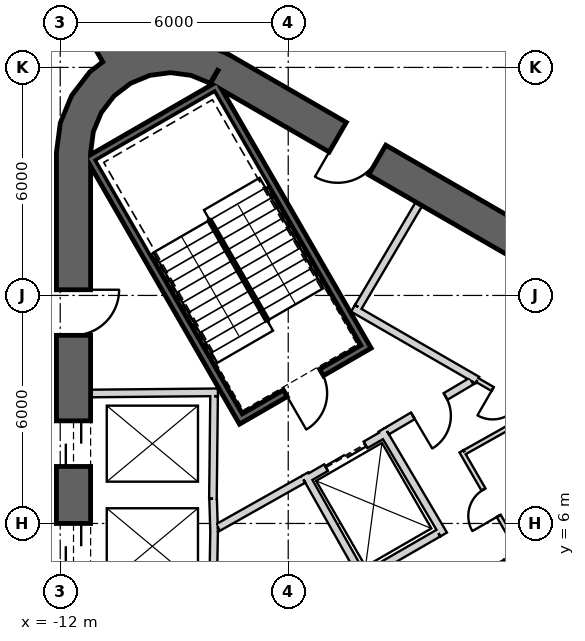
"""IFC4 building model, lengths in metres.
Left out: names, types, materials, properties, quantities, classifications, styles, units other than length and angle.
Written with IfcOpenShell. Run it as: python <this file> out.ifc"""

import sys

from ifc_helpers import new_model, si_unit, direction, frame, frame_2d, origin, place, context, subcontext, project, spatial, polyline, rectangle, outline, extrude, element, fill, save


model = new_model("IFC4")
c1 = context("Model", 3, precision=1e-05, world=origin(), true_north=direction((0.0, 1.0)))
c2 = subcontext(c1, "Body", "Model", "MODEL_VIEW")
j1 = project(units=[si_unit("LENGTHUNIT", "METRE"), si_unit("PLANEANGLEUNIT", "RADIAN")], contexts=[c1])
p1 = place(None, origin())
s1 = spatial("IfcSite", under=j1, at=p1, CompositionType="ELEMENT")
p2 = place(p1, origin())
s2 = spatial("IfcBuilding", under=s1, at=p2, CompositionType="ELEMENT")
p3 = place(p2, frame((0.0, 0.0, 217.2)))
s3 = spatial("IfcBuildingStorey", under=s2, at=p3, CompositionType="ELEMENT", Elevation=217.2)
p4 = place(p3, frame((19.475, 2.208, 0.0), z_axis=(0.0, 0.0, 1.0), x_axis=(-0.866028369851, 0.499994862586, 0.0)))
e1 = element("IfcWall", 1, at=p4, inside=s3, PredefinedType="SHEAR", context=c2, shape_type="SweptSolid", body=[
    extrude(rectangle(XDim=31.523, YDim=0.9, at=frame_2d((15.762, 0.0))), origin(), (0.0, 0.0, 1.0), 4.0),
])
p5 = place(p4, frame((7.062, 0.0, 0.0)))
e2 = element("IfcOpeningElement", 2, at=p5, cuts=e1, PredefinedType="OPENING", context=c2, shape_type="SweptSolid", body=[
    extrude(rectangle(XDim=1.2, YDim=2.4, at=frame_2d((0.6, 1.2))), frame((0.0, 0.46, 0.0), z_axis=(0.0, -1.0, 0.0), x_axis=(1.0, 0.0, 0.0)), (0.0, 0.0, 1.0), 0.92),
])
p6 = place(p4, frame((3.612, 0.0, 0.0)))
e3 = element("IfcOpeningElement", 3, at=p6, cuts=e1, PredefinedType="OPENING", context=c2, shape_type="SweptSolid", body=[
    extrude(rectangle(XDim=1.2, YDim=2.4, at=frame_2d((0.6, 1.2))), frame((0.0, 0.46, 0.0), z_axis=(0.0, -1.0, 0.0), x_axis=(1.0, 0.0, 0.0)), (0.0, 0.0, 1.0), 0.92),
])
p7 = place(p4, frame((26.712, 0.0, 0.0)))
e4 = element("IfcOpeningElement", 4, at=p7, cuts=e1, PredefinedType="OPENING", context=c2, shape_type="SweptSolid", body=[
    extrude(rectangle(XDim=1.2, YDim=2.4, at=frame_2d((0.6, 1.2))), frame((0.0, 0.46, 0.0), z_axis=(0.0, -1.0, 0.0), x_axis=(1.0, 0.0, 0.0)), (0.0, 0.0, 1.0), 0.92),
])
p8 = place(p3, frame((-11.65, 15.762, 0.0), z_axis=(0.0, 0.0, 1.0), x_axis=(0.0, -1.0, 0.0)))
e5 = element("IfcWall", 5, at=p8, inside=s3, PredefinedType="SHEAR", context=c2, shape_type="SweptSolid", body=[
    extrude(rectangle(XDim=31.523, YDim=0.9, at=frame_2d((15.762, 0.0))), origin(), (0.0, 0.0, 1.0), 4.0),
])
p9 = place(p8, frame((7.062, 0.0, 0.0)))
e6 = element("IfcOpeningElement", 6, at=p9, cuts=e5, PredefinedType="OPENING", context=c2, shape_type="SweptSolid", body=[
    extrude(rectangle(XDim=1.2, YDim=2.4, at=frame_2d((0.6, 1.2))), frame((0.0, 0.46, 0.0), z_axis=(0.0, -1.0, 0.0), x_axis=(1.0, 0.0, 0.0)), (0.0, 0.0, 1.0), 0.92),
])
p10 = place(p8, frame((9.762, 0.0, 0.0)))
e7 = element("IfcOpeningElement", 7, at=p10, cuts=e5, PredefinedType="OPENING", context=c2, shape_type="SweptSolid", body=[
    extrude(rectangle(XDim=1.2, YDim=2.4, at=frame_2d((0.6, 1.2))), frame((0.0, 0.46, 0.0), z_axis=(0.0, -1.0, 0.0), x_axis=(1.0, 0.0, 0.0)), (0.0, 0.0, 1.0), 0.92),
])
p11 = place(p8, frame((12.462, 0.0, 0.0)))
e8 = element("IfcOpeningElement", 8, at=p11, cuts=e5, PredefinedType="OPENING", context=c2, shape_type="SweptSolid", body=[
    extrude(rectangle(XDim=1.2, YDim=2.4, at=frame_2d((0.6, 1.2))), frame((0.0, 0.46, 0.0), z_axis=(0.0, -1.0, 0.0), x_axis=(1.0, 0.0, 0.0)), (0.0, 0.0, 1.0), 0.92),
])
p12 = place(p8, frame((15.162, 0.0, 0.0)))
e9 = element("IfcOpeningElement", 9, at=p12, cuts=e5, PredefinedType="OPENING", context=c2, shape_type="SweptSolid", body=[
    extrude(rectangle(XDim=1.2, YDim=2.4, at=frame_2d((0.6, 1.2))), frame((0.0, 0.46, 0.0), z_axis=(0.0, -1.0, 0.0), x_axis=(1.0, 0.0, 0.0)), (0.0, 0.0, 1.0), 0.92),
])
p13 = place(p8, frame((17.862, 0.0, 0.0)))
e10 = element("IfcOpeningElement", 10, at=p13, cuts=e5, PredefinedType="OPENING", context=c2, shape_type="SweptSolid", body=[
    extrude(rectangle(XDim=1.2, YDim=2.4, at=frame_2d((0.6, 1.2))), frame((0.0, 0.46, 0.0), z_axis=(0.0, -1.0, 0.0), x_axis=(1.0, 0.0, 0.0)), (0.0, 0.0, 1.0), 0.92),
])
p14 = place(p8, frame((20.562, 0.0, 0.0)))
e11 = element("IfcOpeningElement", 11, at=p14, cuts=e5, PredefinedType="OPENING", context=c2, shape_type="SweptSolid", body=[
    extrude(rectangle(XDim=1.2, YDim=2.4, at=frame_2d((0.6, 1.2))), frame((0.0, 0.46, 0.0), z_axis=(0.0, -1.0, 0.0), x_axis=(1.0, 0.0, 0.0)), (0.0, 0.0, 1.0), 0.92),
])
p15 = place(p8, frame((23.262, 0.0, 0.0)))
e12 = element("IfcOpeningElement", 12, at=p15, cuts=e5, PredefinedType="OPENING", context=c2, shape_type="SweptSolid", body=[
    extrude(rectangle(XDim=1.2, YDim=2.4, at=frame_2d((0.6, 1.2))), frame((0.0, 0.46, 0.0), z_axis=(0.0, -1.0, 0.0), x_axis=(1.0, 0.0, 0.0)), (0.0, 0.0, 1.0), 0.92),
])
p16 = place(p8, frame((3.612, 0.0, 0.0)))
e13 = element("IfcOpeningElement", 13, at=p16, cuts=e5, PredefinedType="OPENING", context=c2, shape_type="SweptSolid", body=[
    extrude(rectangle(XDim=1.2, YDim=2.4, at=frame_2d((0.6, 1.2))), frame((0.0, 0.46, 0.0), z_axis=(0.0, -1.0, 0.0), x_axis=(1.0, 0.0, 0.0)), (0.0, 0.0, 1.0), 0.92),
])
p17 = place(p8, frame((26.712, 0.0, 0.0)))
e14 = element("IfcOpeningElement", 14, at=p17, cuts=e5, PredefinedType="OPENING", context=c2, shape_type="SweptSolid", body=[
    extrude(rectangle(XDim=1.2, YDim=2.4, at=frame_2d((0.6, 1.2))), frame((0.0, 0.46, 0.0), z_axis=(0.0, -1.0, 0.0), x_axis=(1.0, 0.0, 0.0)), (0.0, 0.0, 1.0), 0.92),
])
p18 = place(p3, origin())
e15 = element("IfcWall", 15, at=p18, inside=s3, PredefinedType="SHEAR", context=c2, shape_type="SweptSolid", body=[
    extrude(outline(polyline([(-7.6, 18.36), (-8.323, 18.659), (-9.1, 18.762), (-9.876, 18.659), (-10.6, 18.36), (-11.221, 17.883), (-11.698, 17.262), (-11.998, 16.538), (-12.1, 15.762), (-11.2, 15.762), (-11.128, 16.305), (-10.919, 16.812), (-10.585, 17.247), (-10.15, 17.58), (-9.644, 17.79), (-9.1, 17.862), (-8.556, 17.79), (-8.05, 17.58), (-7.6, 18.36)])), origin(), (0.0, 0.0, 1.0), 4.0),
])
p19 = place(p3, frame((-10.575, 18.316, 0.0), z_axis=(0.0, 0.0, 1.0), x_axis=(-0.499998001389, 0.86602655768, 0.0)))
e16 = element("IfcWall", 16, at=p19, inside=s3, PredefinedType="SHEAR", context=c2, shape_type="SweptSolid", body=[
    extrude(rectangle(XDim=11.581, YDim=0.7, at=frame_2d((5.791, 0.0))), origin(), (0.0, 0.0, 1.0), 4.0),
])
p20 = place(p3, frame((-11.2, 9.42, 0.0), z_axis=(0.0, 0.0, 1.0), x_axis=(0.999957167047, 0.009255488683, 0.0)))
e17 = element("IfcWall", 17, at=p20, inside=s3, PredefinedType="PLUMBINGWALL", context=c2, shape_type="SweptSolid", body=[
    extrude(rectangle(XDim=3.35, YDim=0.2, at=frame_2d((1.675, 0.0))), origin(), (0.0, 0.0, 1.0), 3.7),
])
p21 = place(p3, frame((-7.951, 9.35, 0.0), z_axis=(0.0, 0.0, 1.0), x_axis=(-0.011120469654, -0.999938165666, 0.0)))
e18 = element("IfcWall", 18, at=p21, inside=s3, PredefinedType="PLUMBINGWALL", context=c2, shape_type="SweptSolid", body=[
    extrude(rectangle(XDim=2.7, YDim=0.2, at=frame_2d((1.35, 0.0))), origin(), (0.0, 0.0, 1.0), 3.7),
])
p22 = place(p3, frame((-7.977, 6.65, 0.0), z_axis=(0.0, 0.0, 1.0), x_axis=(0.030861509705, -0.999523670164, 0.0)))
e19 = element("IfcWall", 19, at=p22, inside=s3, PredefinedType="PLUMBINGWALL", context=c2, shape_type="SweptSolid", body=[
    extrude(rectangle(XDim=0.878, YDim=0.2, at=frame_2d((0.439, 0.0))), origin(), (0.0, 0.0, 1.0), 3.7),
])
p23 = place(p3, frame((-7.949, 5.894, 0.0), z_axis=(0.0, 0.0, 1.0), x_axis=(-0.016809909365, -0.999858703491, 0.0)))
e20 = element("IfcWall", 20, at=p23, inside=s3, PredefinedType="PLUMBINGWALL", context=c2, shape_type="SweptSolid", body=[
    extrude(rectangle(XDim=1.844, YDim=0.2, at=frame_2d((0.922, 0.0))), origin(), (0.0, 0.0, 1.0), 3.7),
])
p24 = place(p3, frame((-11.245, 15.678, -0.3), z_axis=(0.0, 0.0, 1.0), x_axis=(0.499977274689, -0.866038523851, 0.0)))
e21 = element("IfcWall", 21, at=p24, inside=s3, PredefinedType="SHEAR", context=c2, shape_type="SweptSolid", body=[
    extrude(rectangle(XDim=8.1, YDim=0.2, at=frame_2d((4.05, 0.0))), origin(), (0.0, 0.0, 1.0), 4.0),
])
p25 = place(p3, frame((-7.818, 17.541, -0.3), z_axis=(0.0, 0.0, 1.0), x_axis=(-0.866044365799, -0.499967155389, 0.0)))
e22 = element("IfcWall", 22, at=p25, inside=s3, PredefinedType="SHEAR", context=c2, shape_type="SweptSolid", body=[
    extrude(rectangle(XDim=3.8, YDim=0.2, at=frame_2d((1.9, 0.0))), origin(), (0.0, 0.0, 1.0), 4.0),
])
p26 = place(p3, frame((-7.854, 17.405, -0.3), z_axis=(0.0, 0.0, 1.0), x_axis=(0.499997992926, -0.866026562566, 0.0)))
e23 = element("IfcWall", 23, at=p26, inside=s3, PredefinedType="SHEAR", context=c2, shape_type="SweptSolid", body=[
    extrude(rectangle(XDim=7.9, YDim=0.2, at=frame_2d((3.95, 0.0))), origin(), (0.0, 0.0, 1.0), 4.0),
])
p27 = place(p3, frame((-7.159, 8.8, -0.3), z_axis=(0.0, 0.0, 1.0), x_axis=(0.866047807691, 0.499961193289, 0.0)))
e24 = element("IfcWall", 24, at=p27, inside=s3, PredefinedType="SHEAR", context=c2, shape_type="SweptSolid", body=[
    extrude(rectangle(XDim=3.6, YDim=0.2, at=frame_2d((1.8, 0.0))), origin(), (0.0, 0.0, 1.0), 4.0),
])
p28 = place(p27, frame((1.25, 0.0, 0.3)))
e25 = element("IfcOpeningElement", 25, at=p28, cuts=e24, PredefinedType="OPENING", context=c2, shape_type="SweptSolid", body=[
    extrude(rectangle(XDim=1.1, YDim=2.1, at=frame_2d((0.55, 1.05))), frame((0.0, 0.11, 0.0), z_axis=(0.0, -1.0, 0.0), x_axis=(1.0, 0.0, 0.0)), (0.0, 0.0, 1.0), 0.22),
])
p29 = place(p3, frame((-5.524, 7.168, 0.0), z_axis=(0.0, 0.0, 1.0), x_axis=(0.866024647952, 0.500001309137, 0.0)))
e26 = element("IfcWall", 26, at=p29, inside=s3, PredefinedType="PLUMBINGWALL", context=c2, shape_type="SweptSolid", body=[
    extrude(rectangle(XDim=2.4, YDim=0.2, at=frame_2d((1.2, 0.0))), origin(), (0.0, 0.0, 1.0), 3.7),
])
p30 = place(p29, frame((0.6, 0.0, 0.0)))
e27 = element("IfcOpeningElement", 27, at=p30, cuts=e26, PredefinedType="OPENING", context=c2, shape_type="SweptSolid", body=[
    extrude(rectangle(XDim=1.2, YDim=2.4, at=frame_2d((0.6, 1.2))), frame((0.0, 0.11, 0.0), z_axis=(0.0, -1.0, 0.0), x_axis=(1.0, 0.0, 0.0)), (0.0, 0.0, 1.0), 0.22),
])
p31 = place(p3, frame((-4.039, 4.596, 0.0), z_axis=(0.0, 0.0, 1.0), x_axis=(-0.491322718731, 0.870977603649, 0.0)))
e28 = element("IfcWall", 28, at=p31, inside=s3, PredefinedType="PLUMBINGWALL", context=c2, shape_type="SweptSolid", body=[
    extrude(rectangle(XDim=3.1, YDim=0.2, at=frame_2d((1.55, 0.0))), origin(), (0.0, 0.0, 1.0), 3.7),
])
p32 = place(p3, frame((-3.538, 8.465, 0.0), z_axis=(0.0, 0.0, 1.0), x_axis=(0.508616218331, -0.860993346345, 0.0)))
e29 = element("IfcWall", 29, at=p32, inside=s3, PredefinedType="PLUMBINGWALL", context=c2, shape_type="SweptSolid", body=[
    extrude(rectangle(XDim=3.2, YDim=0.2, at=frame_2d((1.6, 0.0))), origin(), (0.0, 0.0, 1.0), 3.7),
])
p33 = place(p3, frame((-2.047, 5.746, 0.0), z_axis=(0.0, 0.0, 1.0), x_axis=(-0.866040491692, -0.499973866067, 0.0)))
e30 = element("IfcWall", 30, at=p33, inside=s3, PredefinedType="PLUMBINGWALL", context=c2, shape_type="SweptSolid", body=[
    extrude(rectangle(XDim=2.129, YDim=0.2, at=frame_2d((1.065, 0.0))), origin(), (0.0, 0.0, 1.0), 3.7),
])
p34 = place(p3, frame((-4.296, 11.66, 0.0), z_axis=(0.0, 0.0, 1.0), x_axis=(0.866027389382, -0.499996560828, 0.0)))
e31 = element("IfcWall", 31, at=p34, inside=s3, PredefinedType="PARTITIONING", context=c2, shape_type="SweptSolid", body=[
    extrude(rectangle(XDim=3.778, YDim=0.2, at=frame_2d((1.889, 0.0))), origin(), (0.0, 0.0, 1.0), 3.7),
])
p35 = place(p3, frame((-2.558, 14.409, 0.0), z_axis=(0.0, 0.0, 1.0), x_axis=(-0.508018930956, -0.861345903683, 0.0)))
e32 = element("IfcWall", 32, at=p35, inside=s3, PredefinedType="PARTITIONING", context=c2, shape_type="SweptSolid", body=[
    extrude(rectangle(XDim=3.15, YDim=0.2, at=frame_2d((1.575, 0.0))), origin(), (0.0, 0.0, 1.0), 3.7),
])
p36 = place(p3, frame((-1.024, 9.771, 0.0), z_axis=(0.0, 0.0, 1.0), x_axis=(0.866039397417, -0.499975761534, 0.0)))
e33 = element("IfcWall", 33, at=p36, inside=s3, PredefinedType="PARTITIONING", context=c2, shape_type="SweptSolid", body=[
    extrude(rectangle(XDim=1.752, YDim=0.12, at=frame_2d((0.876, 0.0))), origin(), (0.0, 0.0, 1.0), 3.7),
])
p37 = place(p36, frame((0.466, 0.0, 0.0)))
e34 = element("IfcOpeningElement", 34, at=p37, cuts=e33, PredefinedType="OPENING", context=c2, shape_type="SweptSolid", body=[
    extrude(rectangle(XDim=0.8, YDim=2.1, at=frame_2d((0.4, 1.05))), frame((0.0, 0.07, 0.0), z_axis=(0.0, -1.0, 0.0), x_axis=(1.0, 0.0, 0.0)), (0.0, 0.0, 1.0), 0.14),
])
p38 = place(p3, frame((-5.6, 7.16, 0.0), z_axis=(0.0, 0.0, 1.0), x_axis=(-0.871340486379, -0.490678873396, 0.0)))
e35 = element("IfcWall", 35, at=p38, inside=s3, PredefinedType="PARTITIONING", context=c2, shape_type="SweptSolid", body=[
    extrude(rectangle(XDim=2.581, YDim=0.2, at=frame_2d((1.291, 0.0))), origin(), (0.0, 0.0, 1.0), 3.7),
])
p39 = place(p3, frame((-1.179, 9.745, 0.0), z_axis=(0.0, 0.0, 1.0), x_axis=(-0.860630814782, -0.509229418482, 0.0)))
e36 = element("IfcWall", 36, at=p39, inside=s3, PredefinedType="PARTITIONING", context=c2, shape_type="SweptSolid", body=[
    extrude(rectangle(XDim=2.582, YDim=0.2, at=frame_2d((1.291, 0.0))), origin(), (0.0, 0.0, 1.0), 3.7),
])
p40 = place(p39, frame((0.791, 0.0, 0.0)))
e37 = element("IfcOpeningElement", 37, at=p40, cuts=e36, PredefinedType="OPENING", context=c2, shape_type="SweptSolid", body=[
    extrude(rectangle(XDim=1.0, YDim=2.1, at=frame_2d((0.5, 1.05))), frame((0.0, 0.11, 0.0), z_axis=(0.0, -1.0, 0.0), x_axis=(1.0, 0.0, 0.0)), (0.0, 0.0, 1.0), 0.22),
])
p41 = place(p3, frame((-0.351, 4.994, 0.0), z_axis=(0.0, 0.0, 1.0), x_axis=(0.866277754418, -0.499562660935, 0.0)))
e38 = element("IfcWall", 38, at=p41, inside=s3, PredefinedType="PARTITIONING", context=c2, shape_type="SweptSolid", body=[
    extrude(rectangle(XDim=5.6, YDim=0.12, at=frame_2d((2.8, 0.0))), origin(), (0.0, 0.0, 1.0), 3.7),
])
p42 = place(p3, frame((-0.295, 4.992, 0.0), z_axis=(0.0, 0.0, 1.0), x_axis=(-0.87699482268, -0.480499824134, 0.0)))
e39 = element("IfcWall", 39, at=p42, inside=s3, PredefinedType="PARTITIONING", context=c2, shape_type="SweptSolid", body=[
    extrude(rectangle(XDim=1.256, YDim=0.12, at=frame_2d((0.628, 0.0))), origin(), (0.0, 0.0, 1.0), 3.7),
])
p43 = place(p3, frame((-1.442, 7.897, 0.0), z_axis=(0.0, 0.0, 1.0), x_axis=(0.499991792115, -0.866030142557, 0.0)))
e40 = element("IfcWall", 40, at=p43, inside=s3, PredefinedType="PARTITIONING", context=c2, shape_type="SweptSolid", body=[
    extrude(rectangle(XDim=3.06, YDim=0.12, at=frame_2d((1.53, 0.0))), origin(), (0.0, 0.0, 1.0), 3.7),
])
p44 = place(p43, frame((1.16, 0.0, 0.0)))
e41 = element("IfcOpeningElement", 41, at=p44, cuts=e40, PredefinedType="OPENING", context=c2, shape_type="SweptSolid", body=[
    extrude(rectangle(XDim=0.8, YDim=2.1, at=frame_2d((0.4, 1.05))), frame((0.0, 0.07, 0.0), z_axis=(0.0, -1.0, 0.0), x_axis=(1.0, 0.0, 0.0)), (0.0, 0.0, 1.0), 0.14),
])
p45 = place(p3, frame((0.414, 8.871, 0.0), z_axis=(0.0, 0.0, 1.0), x_axis=(-0.871809386997, -0.48984527429, 0.0)))
e42 = element("IfcWall", 42, at=p45, inside=s3, PredefinedType="PARTITIONING", context=c2, shape_type="SweptSolid", body=[
    extrude(rectangle(XDim=2.034, YDim=0.12, at=frame_2d((1.017, 0.0))), origin(), (0.0, 0.0, 1.0), 3.7),
])
p46 = place(p3, frame((10.325, 13.784, 0.0), z_axis=(0.0, 0.0, 1.0), x_axis=(-0.866025119466, 0.500000492453, 0.0)))
e43 = element("IfcWall", 43, at=p46, inside=s3, PredefinedType="PARTITIONING", context=c2, shape_type="SweptSolid", body=[
    extrude(rectangle(XDim=18.673, YDim=0.2, at=frame_2d((9.336, 0.0))), origin(), (0.0, 0.0, 1.0), 2.88),
])
p47 = place(p46, frame((15.118, 0.0, 0.0)))
e44 = element("IfcOpeningElement", 44, at=p47, cuts=e43, PredefinedType="OPENING", context=c2, shape_type="SweptSolid", body=[
    extrude(rectangle(XDim=1.0, YDim=2.1, at=frame_2d((0.5, 1.05))), frame((0.0, 0.11, 0.0), z_axis=(0.0, -1.0, 0.0), x_axis=(1.0, 0.0, 0.0)), (0.0, 0.0, 1.0), 0.22),
])
p48 = place(p28, origin())
e45 = element("IfcDoor", 45, at=p48, inside=s3, OperationType="SINGLE_SWING_LEFT", PredefinedType="USERDEFINED", context=c2, shape_type="SweptSolid", body=[
    extrude(rectangle(XDim=1.1, YDim=2.1, at=frame_2d((0.55, 1.05))), frame((0.0, 0.025, 0.0), z_axis=(0.0, -1.0, 0.0), x_axis=(1.0, 0.0, 0.0)), (0.0, 0.0, 1.0), 0.05),
])
fill(e25, e45)
p49 = place(p40, origin())
e46 = element("IfcDoor", 46, at=p49, inside=s3, OperationType="SINGLE_SWING_LEFT", PredefinedType="USERDEFINED", context=c2, shape_type="SweptSolid", body=[
    extrude(rectangle(XDim=1.0, YDim=2.1, at=frame_2d((0.5, 1.05))), frame((0.0, 0.025, 0.0), z_axis=(0.0, -1.0, 0.0), x_axis=(1.0, 0.0, 0.0)), (0.0, 0.0, 1.0), 0.05),
])
fill(e37, e46)
p50 = place(p30, origin())
e47 = element("IfcDoor", 47, at=p50, inside=s3, OperationType="SLIDING_TO_LEFT", PredefinedType="USERDEFINED", context=c2, shape_type="SweptSolid", body=[
    extrude(rectangle(XDim=1.2, YDim=2.4, at=frame_2d((0.6, 1.2))), frame((0.0, 0.025, 0.0), z_axis=(0.0, -1.0, 0.0), x_axis=(1.0, 0.0, 0.0)), (0.0, 0.0, 1.0), 0.05),
])
fill(e27, e47)
p51 = place(p44, origin())
e48 = element("IfcDoor", 48, at=p51, inside=s3, OperationType="SINGLE_SWING_LEFT", PredefinedType="USERDEFINED", context=c2, shape_type="SweptSolid", body=[
    extrude(rectangle(XDim=0.8, YDim=2.1, at=frame_2d((0.4, 1.05))), frame((0.0, 0.025, 0.0), z_axis=(0.0, -1.0, 0.0), x_axis=(1.0, 0.0, 0.0)), (0.0, 0.0, 1.0), 0.05),
])
fill(e41, e48)
p52 = place(p37, origin())
e49 = element("IfcDoor", 49, at=p52, inside=s3, OperationType="SINGLE_SWING_RIGHT", PredefinedType="USERDEFINED", context=c2, shape_type="SweptSolid", body=[
    extrude(rectangle(XDim=0.8, YDim=2.1, at=frame_2d((0.4, 1.05))), frame((0.0, 0.025, 0.0), z_axis=(0.0, -1.0, 0.0), x_axis=(1.0, 0.0, 0.0)), (0.0, 0.0, 1.0), 0.05),
])
fill(e34, e49)
p53 = place(p9, origin())
e50 = element("IfcDoor", 50, at=p53, inside=s3, OperationType="SLIDING_TO_LEFT", PredefinedType="USERDEFINED", context=c2, shape_type="SweptSolid", body=[
    extrude(rectangle(XDim=1.2, YDim=2.4, at=frame_2d((0.6, 1.2))), frame((0.0, 0.025, 0.0), z_axis=(0.0, -1.0, 0.0), x_axis=(1.0, 0.0, 0.0)), (0.0, 0.0, 1.0), 0.05),
])
fill(e6, e50)
p54 = place(p10, origin())
e51 = element("IfcDoor", 51, at=p54, inside=s3, OperationType="SLIDING_TO_LEFT", PredefinedType="USERDEFINED", context=c2, shape_type="SweptSolid", body=[
    extrude(rectangle(XDim=1.2, YDim=2.4, at=frame_2d((0.6, 1.2))), frame((0.0, 0.025, 0.0), z_axis=(0.0, -1.0, 0.0), x_axis=(1.0, 0.0, 0.0)), (0.0, 0.0, 1.0), 0.05),
])
fill(e7, e51)
p55 = place(p7, origin())
e52 = element("IfcDoor", 52, at=p55, inside=s3, OperationType="SINGLE_SWING_LEFT", PredefinedType="USERDEFINED", context=c2, shape_type="SweptSolid", body=[
    extrude(rectangle(XDim=1.2, YDim=2.4, at=frame_2d((0.6, 1.2))), frame((0.0, 0.025, 0.0), z_axis=(0.0, -1.0, 0.0), x_axis=(1.0, 0.0, 0.0)), (0.0, 0.0, 1.0), 0.05),
])
fill(e4, e52)
p56 = place(p16, origin())
e53 = element("IfcDoor", 53, at=p56, inside=s3, OperationType="SINGLE_SWING_LEFT", PredefinedType="USERDEFINED", context=c2, shape_type="SweptSolid", body=[
    extrude(rectangle(XDim=1.2, YDim=2.4, at=frame_2d((0.6, 1.2))), frame((0.0, 0.025, 0.0), z_axis=(0.0, -1.0, 0.0), x_axis=(1.0, 0.0, 0.0)), (0.0, 0.0, 1.0), 0.05),
])
fill(e13, e53)
save(model, sys.argv[1])
